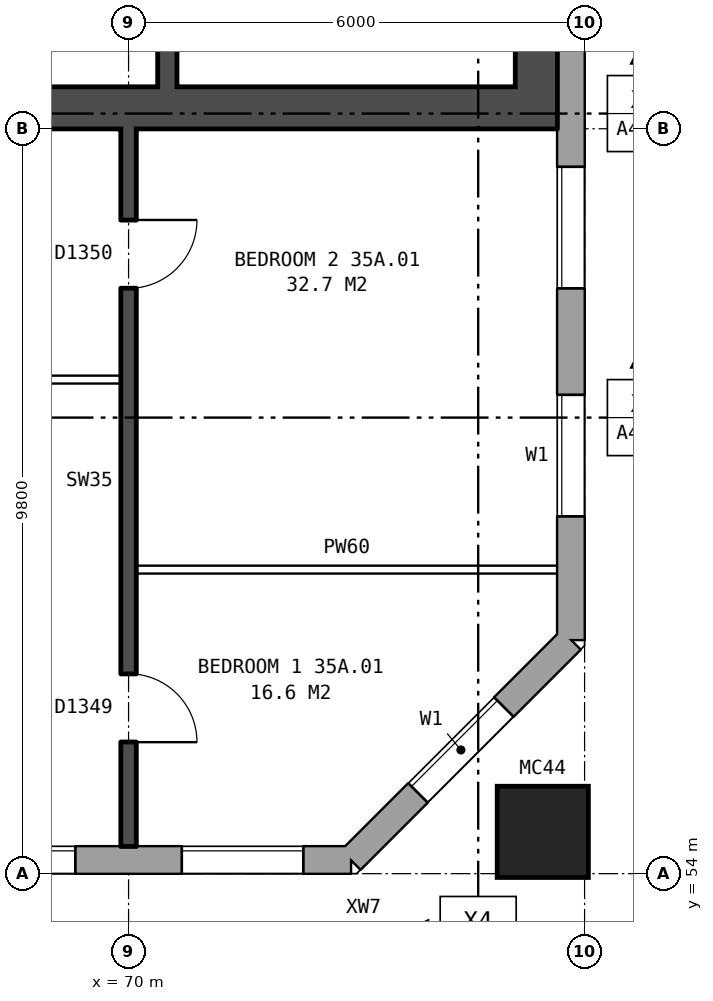
"""IFC4 building model, lengths in metres.
Left out: names, types, materials, properties, quantities, classifications, styles, units other than length and angle.
Written with IfcOpenShell. Run it as: python <this file> out.ifc"""

import sys

from ifc_helpers import new_model, si_unit, direction, frame, frame_2d, origin, origin_2d, place, context, subcontext, project, spatial, rectangle, hollow_rectangle, extrude, element, fill, save


model = new_model("IFC4")
c1 = context("Model", 3, precision=1e-05, world=origin(), true_north=direction((0.0, 1.0)))
c2 = subcontext(c1, "Body", "Model", "MODEL_VIEW")
j1 = project(units=[si_unit("LENGTHUNIT", "METRE"), si_unit("PLANEANGLEUNIT", "RADIAN")], contexts=[c1])
p1 = place(None, origin())
s1 = spatial("IfcSite", under=j1, at=p1, CompositionType="ELEMENT")
p2 = place(p1, origin())
s2 = spatial("IfcBuilding", under=s1, at=p2, CompositionType="ELEMENT")
p3 = place(p2, frame((0.0, 0.0, 126.8)))
s3 = spatial("IfcBuildingStorey", under=s2, at=p3, CompositionType="ELEMENT", Elevation=126.8)
p4 = place(p3, frame((75.45, 54.55, 0.0), z_axis=(0.0, 0.0, 1.0), x_axis=(1.0, 0.0, 0.0)))
e1 = element("IfcColumn", 1, at=p4, inside=s3, PredefinedType="COLUMN", context=c2, shape_type="SweptSolid", body=[
    extrude(hollow_rectangle(XDim=1.2, YDim=1.2, WallThickness=0.065, at=origin_2d()), origin(), (0.0, 0.0, 1.0), 3.1),
])
p5 = place(p3, frame((29.825, 54.18, 0.0), z_axis=(0.0, 0.0, 1.0), x_axis=(1.0, 0.0, 0.0)))
e2 = element("IfcWall", 2, at=p5, inside=s3, PredefinedType="STANDARD", context=c2, shape_type="SweptSolid", body=[
    extrude(rectangle(XDim=43.101, YDim=0.36, at=frame_2d((21.55, 0.0))), origin(), (0.0, 0.0, 1.0), 2.85),
])
p6 = place(p5, frame((1.875, 0.0, 0.8)))
e3 = element("IfcOpeningElement", 3, at=p6, cuts=e2, PredefinedType="OPENING", context=c2, shape_type="SweptSolid", body=[
    extrude(rectangle(XDim=1.6, YDim=1.8, at=frame_2d((0.8, 0.9))), frame((0.0, 0.19, 0.0), z_axis=(0.0, -1.0, 0.0), x_axis=(1.0, 0.0, 0.0)), (0.0, 0.0, 1.0), 0.38),
])
p7 = place(p5, frame((4.375, 0.0, 0.8)))
e4 = element("IfcOpeningElement", 4, at=p7, cuts=e2, PredefinedType="OPENING", context=c2, shape_type="SweptSolid", body=[
    extrude(rectangle(XDim=1.0, YDim=1.8, at=frame_2d((0.5, 0.9))), frame((0.0, 0.19, 0.0), z_axis=(0.0, -1.0, 0.0), x_axis=(1.0, 0.0, 0.0)), (0.0, 0.0, 1.0), 0.38),
])
p8 = place(p5, frame((5.675, 0.0, 1.6)))
e5 = element("IfcOpeningElement", 5, at=p8, cuts=e2, PredefinedType="OPENING", context=c2, shape_type="SweptSolid", body=[
    extrude(rectangle(XDim=0.6, YDim=0.9, at=frame_2d((0.3, 0.45))), frame((0.0, 0.19, 0.0), z_axis=(0.0, -1.0, 0.0), x_axis=(1.0, 0.0, 0.0)), (0.0, 0.0, 1.0), 0.38),
])
p9 = place(p5, frame((10.875, 0.0, 0.8)))
e6 = element("IfcOpeningElement", 6, at=p9, cuts=e2, PredefinedType="OPENING", context=c2, shape_type="SweptSolid", body=[
    extrude(rectangle(XDim=1.6, YDim=1.8, at=frame_2d((0.8, 0.9))), frame((0.0, 0.19, 0.0), z_axis=(0.0, -1.0, 0.0), x_axis=(1.0, 0.0, 0.0)), (0.0, 0.0, 1.0), 0.38),
])
p10 = place(p5, frame((13.875, 0.0, 0.8)))
e7 = element("IfcOpeningElement", 7, at=p10, cuts=e2, PredefinedType="OPENING", context=c2, shape_type="SweptSolid", body=[
    extrude(rectangle(XDim=1.6, YDim=1.8, at=frame_2d((0.8, 0.9))), frame((0.0, 0.19, 0.0), z_axis=(0.0, -1.0, 0.0), x_axis=(1.0, 0.0, 0.0)), (0.0, 0.0, 1.0), 0.38),
])
p11 = place(p5, frame((16.875, 0.0, 0.8)))
e8 = element("IfcOpeningElement", 8, at=p11, cuts=e2, PredefinedType="OPENING", context=c2, shape_type="SweptSolid", body=[
    extrude(rectangle(XDim=1.6, YDim=1.8, at=frame_2d((0.8, 0.9))), frame((0.0, 0.19, 0.0), z_axis=(0.0, -1.0, 0.0), x_axis=(1.0, 0.0, 0.0)), (0.0, 0.0, 1.0), 0.38),
])
p12 = place(p5, frame((19.875, 0.0, 0.8)))
e9 = element("IfcOpeningElement", 9, at=p12, cuts=e2, PredefinedType="OPENING", context=c2, shape_type="SweptSolid", body=[
    extrude(rectangle(XDim=1.6, YDim=1.8, at=frame_2d((0.8, 0.9))), frame((0.0, 0.19, 0.0), z_axis=(0.0, -1.0, 0.0), x_axis=(1.0, 0.0, 0.0)), (0.0, 0.0, 1.0), 0.38),
])
p13 = place(p5, frame((22.875, 0.0, 0.8)))
e10 = element("IfcOpeningElement", 10, at=p13, cuts=e2, PredefinedType="OPENING", context=c2, shape_type="SweptSolid", body=[
    extrude(rectangle(XDim=1.6, YDim=1.8, at=frame_2d((0.8, 0.9))), frame((0.0, 0.19, 0.0), z_axis=(0.0, -1.0, 0.0), x_axis=(1.0, 0.0, 0.0)), (0.0, 0.0, 1.0), 0.38),
])
p14 = place(p5, frame((25.875, 0.0, 0.8)))
e11 = element("IfcOpeningElement", 11, at=p14, cuts=e2, PredefinedType="OPENING", context=c2, shape_type="SweptSolid", body=[
    extrude(rectangle(XDim=1.6, YDim=1.8, at=frame_2d((0.8, 0.9))), frame((0.0, 0.19, 0.0), z_axis=(0.0, -1.0, 0.0), x_axis=(1.0, 0.0, 0.0)), (0.0, 0.0, 1.0), 0.38),
])
p15 = place(p5, frame((28.875, 0.0, 0.8)))
e12 = element("IfcOpeningElement", 12, at=p15, cuts=e2, PredefinedType="OPENING", context=c2, shape_type="SweptSolid", body=[
    extrude(rectangle(XDim=1.6, YDim=1.8, at=frame_2d((0.8, 0.9))), frame((0.0, 0.19, 0.0), z_axis=(0.0, -1.0, 0.0), x_axis=(1.0, 0.0, 0.0)), (0.0, 0.0, 1.0), 0.38),
])
p16 = place(p5, frame((31.875, 0.0, 0.8)))
e13 = element("IfcOpeningElement", 13, at=p16, cuts=e2, PredefinedType="OPENING", context=c2, shape_type="SweptSolid", body=[
    extrude(rectangle(XDim=1.6, YDim=1.8, at=frame_2d((0.8, 0.9))), frame((0.0, 0.19, 0.0), z_axis=(0.0, -1.0, 0.0), x_axis=(1.0, 0.0, 0.0)), (0.0, 0.0, 1.0), 0.38),
])
p17 = place(p5, frame((34.375, 0.0, 0.8)))
e14 = element("IfcOpeningElement", 14, at=p17, cuts=e2, PredefinedType="OPENING", context=c2, shape_type="SweptSolid", body=[
    extrude(rectangle(XDim=1.2, YDim=0.9, at=frame_2d((0.6, 0.45))), frame((0.0, 0.19, 0.0), z_axis=(0.0, -1.0, 0.0), x_axis=(1.0, 0.0, 0.0)), (0.0, 0.0, 1.0), 0.38),
])
p18 = place(p5, frame((37.875, 0.0, 0.8)))
e15 = element("IfcOpeningElement", 15, at=p18, cuts=e2, PredefinedType="OPENING", context=c2, shape_type="SweptSolid", body=[
    extrude(rectangle(XDim=1.6, YDim=1.8, at=frame_2d((0.8, 0.9))), frame((0.0, 0.19, 0.0), z_axis=(0.0, -1.0, 0.0), x_axis=(1.0, 0.0, 0.0)), (0.0, 0.0, 1.0), 0.38),
])
p19 = place(p5, frame((40.875, 0.0, 0.8)))
e16 = element("IfcOpeningElement", 16, at=p19, cuts=e2, PredefinedType="OPENING", context=c2, shape_type="SweptSolid", body=[
    extrude(rectangle(XDim=1.6, YDim=1.8, at=frame_2d((0.8, 0.9))), frame((0.0, 0.19, 0.0), z_axis=(0.0, -1.0, 0.0), x_axis=(1.0, 0.0, 0.0)), (0.0, 0.0, 1.0), 0.38),
])
p20 = place(p5, frame((7.525, 0.0, 0.8)))
e17 = element("IfcOpeningElement", 17, at=p20, cuts=e2, PredefinedType="OPENING", context=c2, shape_type="SweptSolid", body=[
    extrude(rectangle(XDim=0.6, YDim=0.9, at=frame_2d((0.3, 0.45))), frame((0.0, 0.19, 0.0), z_axis=(0.0, -1.0, 0.0), x_axis=(1.0, 0.0, 0.0)), (0.0, 0.0, 1.0), 0.38),
])
p21 = place(p5, frame((8.525, 0.0, 0.8)))
e18 = element("IfcOpeningElement", 18, at=p21, cuts=e2, PredefinedType="OPENING", context=c2, shape_type="SweptSolid", body=[
    extrude(rectangle(XDim=1.4, YDim=1.8, at=frame_2d((0.7, 0.9))), frame((0.0, 0.19, 0.0), z_axis=(0.0, -1.0, 0.0), x_axis=(1.0, 0.0, 0.0)), (0.0, 0.0, 1.0), 0.38),
])
p22 = place(p5, frame((36.725, 0.0, 1.7)))
e19 = element("IfcOpeningElement", 19, at=p22, cuts=e2, PredefinedType="OPENING", context=c2, shape_type="SweptSolid", body=[
    extrude(rectangle(XDim=0.8, YDim=0.9, at=frame_2d((0.4, 0.45))), frame((0.0, 0.19, 0.0), z_axis=(0.0, -1.0, 0.0), x_axis=(1.0, 0.0, 0.0)), (0.0, 0.0, 1.0), 0.38),
])
p23 = place(p3, frame((72.925, 54.18, 0.0), z_axis=(0.0, 0.0, 1.0), x_axis=(0.707106781187, 0.707106781187, 0.0)))
e20 = element("IfcWall", 20, at=p23, inside=s3, PredefinedType="STANDARD", context=c2, shape_type="SweptSolid", body=[
    extrude(rectangle(XDim=4.094, YDim=0.36, at=frame_2d((2.047, 0.0))), origin(), (0.0, 0.0, 1.0), 2.85),
])
p24 = place(p23, frame((1.247, 0.0, 0.8)))
e21 = element("IfcOpeningElement", 21, at=p24, cuts=e20, PredefinedType="OPENING", context=c2, shape_type="SweptSolid", body=[
    extrude(rectangle(XDim=1.6, YDim=1.8, at=frame_2d((0.8, 0.9))), frame((0.0, 0.19, 0.0), z_axis=(0.0, -1.0, 0.0), x_axis=(1.0, 0.0, 0.0)), (0.0, 0.0, 1.0), 0.38),
])
p25 = place(p3, frame((75.82, 57.075, 0.0), z_axis=(0.0, 0.0, 1.0), x_axis=(0.0, 1.0, 0.0)))
e22 = element("IfcWall", 22, at=p25, inside=s3, PredefinedType="STANDARD", context=c2, shape_type="SweptSolid", body=[
    extrude(rectangle(XDim=25.851, YDim=0.36, at=frame_2d((12.925, 0.0))), origin(), (0.0, 0.0, 1.0), 2.85),
])
p26 = place(p25, frame((1.625, 0.0, 0.8)))
e23 = element("IfcOpeningElement", 23, at=p26, cuts=e22, PredefinedType="OPENING", context=c2, shape_type="SweptSolid", body=[
    extrude(rectangle(XDim=1.6, YDim=1.8, at=frame_2d((0.8, 0.9))), frame((0.0, 0.19, 0.0), z_axis=(0.0, -1.0, 0.0), x_axis=(1.0, 0.0, 0.0)), (0.0, 0.0, 1.0), 0.38),
])
p27 = place(p25, frame((4.625, 0.0, 0.8)))
e24 = element("IfcOpeningElement", 24, at=p27, cuts=e22, PredefinedType="OPENING", context=c2, shape_type="SweptSolid", body=[
    extrude(rectangle(XDim=1.6, YDim=1.8, at=frame_2d((0.8, 0.9))), frame((0.0, 0.19, 0.0), z_axis=(0.0, -1.0, 0.0), x_axis=(1.0, 0.0, 0.0)), (0.0, 0.0, 1.0), 0.38),
])
p28 = place(p25, frame((19.625, 0.0, 0.8)))
e25 = element("IfcOpeningElement", 25, at=p28, cuts=e22, PredefinedType="OPENING", context=c2, shape_type="SweptSolid", body=[
    extrude(rectangle(XDim=1.6, YDim=1.8, at=frame_2d((0.8, 0.9))), frame((0.0, 0.19, 0.0), z_axis=(0.0, -1.0, 0.0), x_axis=(1.0, 0.0, 0.0)), (0.0, 0.0, 1.0), 0.38),
])
p29 = place(p25, frame((22.625, 0.0, 0.8)))
e26 = element("IfcOpeningElement", 26, at=p29, cuts=e22, PredefinedType="OPENING", context=c2, shape_type="SweptSolid", body=[
    extrude(rectangle(XDim=1.6, YDim=1.8, at=frame_2d((0.8, 0.9))), frame((0.0, 0.19, 0.0), z_axis=(0.0, -1.0, 0.0), x_axis=(1.0, 0.0, 0.0)), (0.0, 0.0, 1.0), 0.38),
])
p30 = place(p3, frame((75.365, 63.8, 0.0), z_axis=(0.0, 0.0, 1.0), x_axis=(0.0, 1.0, 0.0)))
e27 = element("IfcWall", 27, at=p30, inside=s3, PredefinedType="SHEAR", context=c2, shape_type="SweptSolid", body=[
    extrude(rectangle(XDim=12.4, YDim=0.55, at=frame_2d((6.2, 0.0))), origin(), (0.0, 0.0, 1.0), 2.85),
])
p31 = place(p3, frame((67.19, 64.075, 0.0), z_axis=(0.0, 0.0, 1.0), x_axis=(1.0, 0.0, 0.0)))
e28 = element("IfcWall", 28, at=p31, inside=s3, PredefinedType="SHEAR", context=c2, shape_type="SweptSolid", body=[
    extrude(rectangle(XDim=7.9, YDim=0.55, at=frame_2d((3.95, 0.0))), origin(), (0.0, 0.0, 1.0), 2.85),
])
p32 = place(p3, frame((70.51, 64.35, 0.0), z_axis=(0.0, 0.0, 1.0), x_axis=(0.0, 1.0, 0.0)))
e29 = element("IfcWall", 29, at=p32, inside=s3, PredefinedType="SHEAR", context=c2, shape_type="SweptSolid", body=[
    extrude(rectangle(XDim=2.375, YDim=0.25, at=frame_2d((1.188, 0.0))), origin(), (0.0, 0.0, 1.0), 2.85),
])
p33 = place(p3, frame((70.1, 58.0, 0.0), z_axis=(0.0, 0.0, 1.0), x_axis=(1.0, 0.0, 0.0)))
e30 = element("IfcWall", 30, at=p33, inside=s3, PredefinedType="PARTITIONING", context=c2, shape_type="SweptSolid", body=[
    extrude(rectangle(XDim=5.54, YDim=0.1, at=frame_2d((2.77, 0.0))), origin(), (0.0, 0.0, 1.0), 2.85),
])
p34 = place(p3, frame((64.1, 60.5, 0.0), z_axis=(0.0, 0.0, 1.0), x_axis=(1.0, 0.0, 0.0)))
e31 = element("IfcWall", 31, at=p34, inside=s3, PredefinedType="PARTITIONING", context=c2, shape_type="SweptSolid", body=[
    extrude(rectangle(XDim=5.8, YDim=0.1, at=frame_2d((2.9, 0.0))), origin(), (0.0, 0.0, 1.0), 2.85),
])
p35 = place(p34, frame((3.6, 0.0, 0.0)))
e32 = element("IfcOpeningElement", 32, at=p35, cuts=e31, PredefinedType="OPENING", context=c2, shape_type="SweptSolid", body=[
    extrude(rectangle(XDim=0.9, YDim=2.1, at=frame_2d((0.45, 1.05))), frame((0.0, 0.06, 0.0), z_axis=(0.0, -1.0, 0.0), x_axis=(1.0, 0.0, 0.0)), (0.0, 0.0, 1.0), 0.12),
])
p36 = place(p34, frame((0.7, 0.0, 0.0)))
e33 = element("IfcOpeningElement", 33, at=p36, cuts=e31, PredefinedType="OPENING", context=c2, shape_type="SweptSolid", body=[
    extrude(rectangle(XDim=0.9, YDim=2.1, at=frame_2d((0.45, 1.05))), frame((0.0, 0.06, 0.0), z_axis=(0.0, -1.0, 0.0), x_axis=(1.0, 0.0, 0.0)), (0.0, 0.0, 1.0), 0.12),
])
p37 = place(p3, frame((70.0, 54.36, 0.0), z_axis=(0.0, 0.0, 1.0), x_axis=(0.0, 1.0, 0.0)))
e34 = element("IfcWall", 34, at=p37, inside=s3, PredefinedType="SOLIDWALL", context=c2, shape_type="SweptSolid", body=[
    extrude(rectangle(XDim=9.44, YDim=0.2, at=frame_2d((4.72, 0.0))), origin(), (0.0, 0.0, 1.0), 2.85),
])
p38 = place(p37, frame((1.37, 0.0, 0.0)))
e35 = element("IfcOpeningElement", 35, at=p38, cuts=e34, PredefinedType="OPENING", context=c2, shape_type="SweptSolid", body=[
    extrude(rectangle(XDim=0.9, YDim=2.1, at=frame_2d((0.45, 1.05))), frame((0.0, 0.11, 0.0), z_axis=(0.0, -1.0, 0.0), x_axis=(1.0, 0.0, 0.0)), (0.0, 0.0, 1.0), 0.22),
])
p39 = place(p37, frame((7.34, 0.0, 0.0)))
e36 = element("IfcOpeningElement", 36, at=p39, cuts=e34, PredefinedType="OPENING", context=c2, shape_type="SweptSolid", body=[
    extrude(rectangle(XDim=0.9, YDim=2.1, at=frame_2d((0.45, 1.05))), frame((0.0, 0.11, 0.0), z_axis=(0.0, -1.0, 0.0), x_axis=(1.0, 0.0, 0.0)), (0.0, 0.0, 1.0), 0.22),
])
p40 = place(p18, origin())
e37 = element("IfcWindow", 37, at=p40, inside=s3, PartitioningType="SINGLE_PANEL", PredefinedType="WINDOW", context=c2, shape_type="SweptSolid", body=[
    extrude(rectangle(XDim=1.6, YDim=1.8, at=frame_2d((0.8, 0.9))), frame((0.0, 0.15, 0.0), z_axis=(0.0, -1.0, 0.0), x_axis=(1.0, 0.0, 0.0)), (0.0, 0.0, 1.0), 0.06),
])
fill(e15, e37)
p41 = place(p19, origin())
e38 = element("IfcWindow", 38, at=p41, inside=s3, PartitioningType="SINGLE_PANEL", PredefinedType="WINDOW", context=c2, shape_type="SweptSolid", body=[
    extrude(rectangle(XDim=1.6, YDim=1.8, at=frame_2d((0.8, 0.9))), frame((0.0, 0.15, 0.0), z_axis=(0.0, -1.0, 0.0), x_axis=(1.0, 0.0, 0.0)), (0.0, 0.0, 1.0), 0.06),
])
fill(e16, e38)
p42 = place(p24, origin())
e39 = element("IfcWindow", 39, at=p42, inside=s3, PartitioningType="SINGLE_PANEL", PredefinedType="WINDOW", context=c2, shape_type="SweptSolid", body=[
    extrude(rectangle(XDim=1.6, YDim=1.8, at=frame_2d((0.8, 0.9))), frame((0.0, 0.15, 0.0), z_axis=(0.0, -1.0, 0.0), x_axis=(1.0, 0.0, 0.0)), (0.0, 0.0, 1.0), 0.06),
])
fill(e21, e39)
p43 = place(p26, origin())
e40 = element("IfcWindow", 40, at=p43, inside=s3, PartitioningType="SINGLE_PANEL", PredefinedType="WINDOW", context=c2, shape_type="SweptSolid", body=[
    extrude(rectangle(XDim=1.6, YDim=1.8, at=frame_2d((0.8, 0.9))), frame((0.0, 0.15, 0.0), z_axis=(0.0, -1.0, 0.0), x_axis=(1.0, 0.0, 0.0)), (0.0, 0.0, 1.0), 0.06),
])
fill(e23, e40)
p44 = place(p27, origin())
e41 = element("IfcWindow", 41, at=p44, inside=s3, PartitioningType="SINGLE_PANEL", PredefinedType="WINDOW", context=c2, shape_type="SweptSolid", body=[
    extrude(rectangle(XDim=1.6, YDim=1.8, at=frame_2d((0.8, 0.9))), frame((0.0, 0.15, 0.0), z_axis=(0.0, -1.0, 0.0), x_axis=(1.0, 0.0, 0.0)), (0.0, 0.0, 1.0), 0.06),
])
fill(e24, e41)
p45 = place(p38, frame((0.9, 0.0, 0.0), z_axis=(0.0, 0.0, 1.0), x_axis=(-1.0, 0.0, 0.0)))
e42 = element("IfcDoor", 42, at=p45, inside=s3, OperationType="SINGLE_SWING_RIGHT", PredefinedType="DOOR", context=c2, shape_type="SweptSolid", body=[
    extrude(rectangle(XDim=0.9, YDim=2.1, at=frame_2d((0.45, 1.05))), frame((0.0, 0.025, 0.0), z_axis=(0.0, -1.0, 0.0), x_axis=(1.0, 0.0, 0.0)), (0.0, 0.0, 1.0), 0.05),
])
fill(e35, e42)
p46 = place(p39, frame((0.9, 0.0, 0.0), z_axis=(0.0, 0.0, 1.0), x_axis=(-1.0, 0.0, 0.0)))
e43 = element("IfcDoor", 43, at=p46, inside=s3, OperationType="SINGLE_SWING_LEFT", PredefinedType="DOOR", context=c2, shape_type="SweptSolid", body=[
    extrude(rectangle(XDim=0.9, YDim=2.1, at=frame_2d((0.45, 1.05))), frame((0.0, 0.025, 0.0), z_axis=(0.0, -1.0, 0.0), x_axis=(1.0, 0.0, 0.0)), (0.0, 0.0, 1.0), 0.05),
])
fill(e36, e43)
save(model, sys.argv[1])
